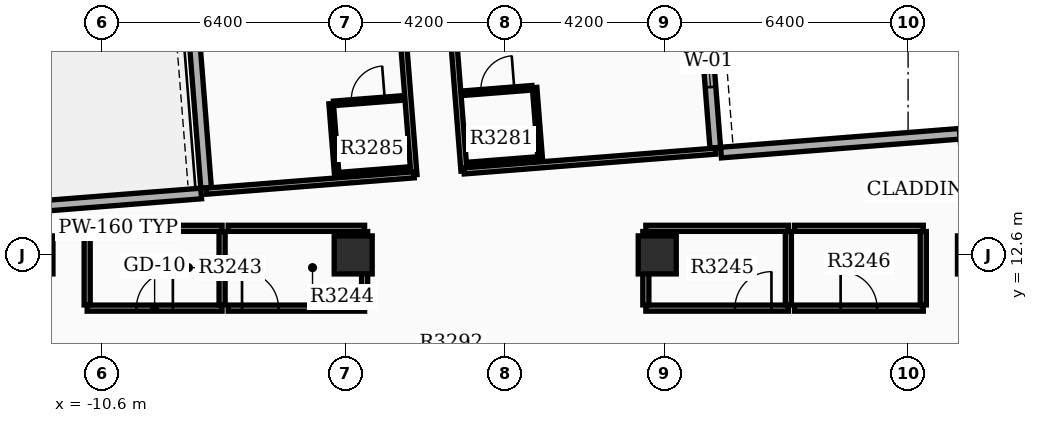
"""IFC4 building model, lengths in metres.
Left out: names, types, materials, properties, quantities, classifications, styles, units other than length and angle.
Written with IfcOpenShell. Run it as: python <this file> out.ifc"""

import sys

from ifc_helpers import new_model, si_unit, direction, frame, frame_2d, origin, origin_2d, place, context, subcontext, project, spatial, rectangle, extrude, element, fill, save


model = new_model("IFC4")
c1 = context("Model", 3, precision=1e-05, world=origin(), true_north=direction((0.0, 1.0)))
c2 = subcontext(c1, "Body", "Model", "MODEL_VIEW")
j1 = project(units=[si_unit("LENGTHUNIT", "METRE"), si_unit("PLANEANGLEUNIT", "RADIAN")], contexts=[c1])
p1 = place(None, origin())
s1 = spatial("IfcSite", under=j1, at=p1, CompositionType="ELEMENT")
p2 = place(p1, origin())
s2 = spatial("IfcBuilding", under=s1, at=p2, CompositionType="ELEMENT")
p3 = place(p2, frame((0.0, 0.0, 205.2)))
s3 = spatial("IfcBuildingStorey", under=s2, at=p3, CompositionType="ELEMENT", Elevation=205.2)
for number, where, z_axis, x_axis in (
    (1, (12.4, 12.6, 0.0), (0.0, 0.0, 1.0), (1.0, 0.0, 0.0)),
    (2, (-12.4, 12.6, 0.0), (0.0, 0.0, 1.0), (1.0, 0.0, 0.0)),
    (3, (4.0, 12.6, 0.0), (0.0, 0.0, 1.0), (1.0, 0.0, 0.0)),
    (4, (-4.0, 12.6, 0.0), (0.0, 0.0, 1.0), (1.0, 0.0, 0.0)),
):
    element("IfcColumn", number, at=place(p3, frame(where, z_axis=z_axis, x_axis=x_axis)), inside=s3, PredefinedType="COLUMN", context=c2, shape_type="SweptSolid", body=[
        extrude(rectangle(XDim=1.0, YDim=1.0, at=origin_2d()), origin(), (0.0, 0.0, 1.0), 3.9),
    ])
p4 = place(p3, frame((5.527, 15.421, 0.0), z_axis=(0.0, 0.0, 1.0), x_axis=(-0.078452802979, 0.996917828963, 0.0)))
e5 = element("IfcWall", 5, at=p4, inside=s3, PredefinedType="STANDARD", context=c2, shape_type="SweptSolid", body=[
    extrude(rectangle(XDim=20.1, YDim=0.28, at=frame_2d((10.05, 0.0))), origin(), (0.0, 0.0, 1.0), 3.18),
])
p5 = place(p4, frame((1.6, 0.0, 0.8)))
e6 = element("IfcOpeningElement", 6, at=p5, cuts=e5, PredefinedType="OPENING", context=c2, shape_type="SweptSolid", body=[
    extrude(rectangle(XDim=1.4, YDim=1.6, at=frame_2d((0.7, 0.8))), frame((0.0, 0.15, 0.0), z_axis=(0.0, -1.0, 0.0), x_axis=(1.0, 0.0, 0.0)), (0.0, 0.0, 1.0), 0.3),
])
p6 = place(p4, frame((4.8, 0.0, 0.8)))
e7 = element("IfcOpeningElement", 7, at=p6, cuts=e5, PredefinedType="OPENING", context=c2, shape_type="SweptSolid", body=[
    extrude(rectangle(XDim=1.4, YDim=1.6, at=frame_2d((0.7, 0.8))), frame((0.0, 0.15, 0.0), z_axis=(0.0, -1.0, 0.0), x_axis=(1.0, 0.0, 0.0)), (0.0, 0.0, 1.0), 0.3),
])
p7 = place(p4, frame((12.75, 0.0, 0.8)))
e8 = element("IfcOpeningElement", 8, at=p7, cuts=e5, PredefinedType="OPENING", context=c2, shape_type="SweptSolid", body=[
    extrude(rectangle(XDim=1.4, YDim=1.6, at=frame_2d((0.7, 0.8))), frame((0.0, 0.15, 0.0), z_axis=(0.0, -1.0, 0.0), x_axis=(1.0, 0.0, 0.0)), (0.0, 0.0, 1.0), 0.3),
])
p8 = place(p4, frame((15.95, 0.0, 0.8)))
e9 = element("IfcOpeningElement", 9, at=p8, cuts=e5, PredefinedType="OPENING", context=c2, shape_type="SweptSolid", body=[
    extrude(rectangle(XDim=1.4, YDim=1.6, at=frame_2d((0.7, 0.8))), frame((0.0, 0.15, 0.0), z_axis=(0.0, -1.0, 0.0), x_axis=(1.0, 0.0, 0.0)), (0.0, 0.0, 1.0), 0.3),
])
p9 = place(p3, frame((-9.448, 34.405, 0.0), z_axis=(0.0, 0.0, 1.0), x_axis=(0.078452802979, -0.996917828963, 0.0)))
e10 = element("IfcWall", 10, at=p9, inside=s3, PredefinedType="STANDARD", context=c2, shape_type="SweptSolid", body=[
    extrude(rectangle(XDim=20.1, YDim=0.28, at=frame_2d((10.05, 0.0))), origin(), (0.0, 0.0, 1.0), 3.18),
])
p10 = place(p9, frame((1.6, 0.0, 0.8)))
e11 = element("IfcOpeningElement", 11, at=p10, cuts=e10, PredefinedType="OPENING", context=c2, shape_type="SweptSolid", body=[
    extrude(rectangle(XDim=1.4, YDim=1.6, at=frame_2d((0.7, 0.8))), frame((0.0, 0.15, 0.0), z_axis=(0.0, -1.0, 0.0), x_axis=(1.0, 0.0, 0.0)), (0.0, 0.0, 1.0), 0.3),
])
p11 = place(p9, frame((4.8, 0.0, 0.8)))
e12 = element("IfcOpeningElement", 12, at=p11, cuts=e10, PredefinedType="OPENING", context=c2, shape_type="SweptSolid", body=[
    extrude(rectangle(XDim=1.4, YDim=1.6, at=frame_2d((0.7, 0.8))), frame((0.0, 0.15, 0.0), z_axis=(0.0, -1.0, 0.0), x_axis=(1.0, 0.0, 0.0)), (0.0, 0.0, 1.0), 0.3),
])
p12 = place(p9, frame((8.0, 0.0, 0.8)))
e13 = element("IfcOpeningElement", 13, at=p12, cuts=e10, PredefinedType="OPENING", context=c2, shape_type="SweptSolid", body=[
    extrude(rectangle(XDim=1.4, YDim=1.6, at=frame_2d((0.7, 0.8))), frame((0.0, 0.15, 0.0), z_axis=(0.0, -1.0, 0.0), x_axis=(1.0, 0.0, 0.0)), (0.0, 0.0, 1.0), 0.3),
])
p13 = place(p9, frame((11.2, 0.0, 0.8)))
e14 = element("IfcOpeningElement", 14, at=p13, cuts=e10, PredefinedType="OPENING", context=c2, shape_type="SweptSolid", body=[
    extrude(rectangle(XDim=1.4, YDim=1.6, at=frame_2d((0.7, 0.8))), frame((0.0, 0.15, 0.0), z_axis=(0.0, -1.0, 0.0), x_axis=(1.0, 0.0, 0.0)), (0.0, 0.0, 1.0), 0.3),
])
p14 = place(p9, frame((15.0, 0.0, 0.0)))
e15 = element("IfcOpeningElement", 15, at=p14, cuts=e10, PredefinedType="OPENING", context=c2, shape_type="SweptSolid", body=[
    extrude(rectangle(XDim=0.96, YDim=2.1, at=frame_2d((0.48, 1.05))), frame((0.0, 0.15, 0.0), z_axis=(0.0, -1.0, 0.0), x_axis=(1.0, 0.0, 0.0)), (0.0, 0.0, 1.0), 0.3),
])
p15 = place(p3, frame((11.958, 15.787, 0.0), z_axis=(0.0, 0.0, 1.0), x_axis=(-0.996916125428, -0.078474447191, 0.0)))
e16 = element("IfcWall", 16, at=p15, inside=s3, PredefinedType="STANDARD", context=c2, shape_type="SweptSolid", body=[
    extrude(rectangle(XDim=6.3, YDim=0.28, at=frame_2d((3.15, 0.0))), origin(), (0.0, 0.0, 1.0), 3.18),
])
p16 = place(p3, frame((-14.281, 13.722, 0.0), z_axis=(0.0, 0.0, 1.0), x_axis=(0.99691915642, 0.078435932851, 0.0)))
e17 = element("IfcWall", 17, at=p16, inside=s3, PredefinedType="STANDARD", context=c2, shape_type="SweptSolid", body=[
    extrude(rectangle(XDim=6.3, YDim=0.28, at=frame_2d((3.15, 0.0))), origin(), (0.0, 0.0, 1.0), 3.18),
])
p17 = place(p3, frame((-11.0, 11.2, 0.0), z_axis=(0.0, 0.0, 1.0), x_axis=(1.0, 0.0, 0.0)))
e18 = element("IfcWall", 18, at=p17, inside=s3, PredefinedType="PARTITIONING", context=c2, shape_type="SweptSolid", body=[
    extrude(rectangle(XDim=3.55, YDim=0.16, at=frame_2d((1.775, 0.0))), origin(), (0.0, 0.0, 1.0), 3.17),
])
p18 = place(p17, frame((1.295, 0.0, 0.0)))
e19 = element("IfcOpeningElement", 19, at=p18, cuts=e18, PredefinedType="OPENING", context=c2, shape_type="SweptSolid", body=[
    extrude(rectangle(XDim=0.96, YDim=2.15, at=frame_2d((0.48, 1.075))), frame((0.0, 0.09, 0.0), z_axis=(0.0, -1.0, 0.0), x_axis=(1.0, 0.0, 0.0)), (0.0, 0.0, 1.0), 0.18),
])
p19 = place(p3, frame((-11.0, 13.3, 0.0), z_axis=(0.0, 0.0, 1.0), x_axis=(1.0, 0.0, 0.0)))
e20 = element("IfcWall", 20, at=p19, inside=s3, PredefinedType="PARTITIONING", context=c2, shape_type="SweptSolid", body=[
    extrude(rectangle(XDim=3.55, YDim=0.16, at=frame_2d((1.775, 0.0))), origin(), (0.0, 0.0, 1.0), 3.17),
])
for number, where, z_axis, x_axis in (
    (21, (-11.0, 11.285, 0.0), (0.0, 0.0, 1.0), (0.0, 1.0, 0.0)),
    (22, (-7.45, 11.285, 0.0), (0.0, 0.0, 1.0), (0.0, 1.0, 0.0)),
):
    element("IfcWall", number, at=place(p3, frame(where, z_axis=z_axis, x_axis=x_axis)), inside=s3, PredefinedType="PARTITIONING", context=c2, shape_type="SweptSolid", body=[
        extrude(rectangle(XDim=1.93, YDim=0.16, at=frame_2d((0.965, 0.0))), origin(), (0.0, 0.0, 1.0), 3.17),
    ])
p20 = place(p3, frame((-7.29, 11.2, 0.0), z_axis=(0.0, 0.0, 1.0), x_axis=(1.0, 0.0, 0.0)))
e23 = element("IfcWall", 23, at=p20, inside=s3, PredefinedType="PARTITIONING", context=c2, shape_type="SweptSolid", body=[
    extrude(rectangle(XDim=3.59, YDim=0.16, at=frame_2d((1.795, 0.0))), origin(), (0.0, 0.0, 1.0), 3.17),
])
p21 = place(p20, frame((0.365, 0.0, 0.0)))
e24 = element("IfcOpeningElement", 24, at=p21, cuts=e23, PredefinedType="OPENING", context=c2, shape_type="SweptSolid", body=[
    extrude(rectangle(XDim=0.96, YDim=2.15, at=frame_2d((0.48, 1.075))), frame((0.0, 0.09, 0.0), z_axis=(0.0, -1.0, 0.0), x_axis=(1.0, 0.0, 0.0)), (0.0, 0.0, 1.0), 0.18),
])
p22 = place(p3, frame((-7.29, 13.3, 0.0), z_axis=(0.0, 0.0, 1.0), x_axis=(1.0, 0.0, 0.0)))
e25 = element("IfcWall", 25, at=p22, inside=s3, PredefinedType="PARTITIONING", context=c2, shape_type="SweptSolid", body=[
    extrude(rectangle(XDim=3.59, YDim=0.16, at=frame_2d((1.795, 0.0))), origin(), (0.0, 0.0, 1.0), 3.17),
])
p23 = place(p3, frame((-3.7, 11.285, 0.0), z_axis=(0.0, 0.0, 1.0), x_axis=(0.0, 1.0, 0.0)))
e26 = element("IfcWall", 26, at=p23, inside=s3, PredefinedType="PARTITIONING", context=c2, shape_type="SweptSolid", body=[
    extrude(rectangle(XDim=1.93, YDim=0.16, at=frame_2d((0.965, 0.0))), origin(), (0.0, 0.0, 1.0), 3.17),
])
p24 = place(p3, frame((3.7, 11.2, 0.0), z_axis=(0.0, 0.0, 1.0), x_axis=(1.0, 0.0, 0.0)))
e27 = element("IfcWall", 27, at=p24, inside=s3, PredefinedType="PARTITIONING", context=c2, shape_type="SweptSolid", body=[
    extrude(rectangle(XDim=3.75, YDim=0.16, at=frame_2d((1.875, 0.0))), origin(), (0.0, 0.0, 1.0), 3.17),
])
p25 = place(p24, frame((2.345, 0.0, 0.0)))
e28 = element("IfcOpeningElement", 28, at=p25, cuts=e27, PredefinedType="OPENING", context=c2, shape_type="SweptSolid", body=[
    extrude(rectangle(XDim=0.96, YDim=2.15, at=frame_2d((0.48, 1.075))), frame((0.0, 0.09, 0.0), z_axis=(0.0, -1.0, 0.0), x_axis=(1.0, 0.0, 0.0)), (0.0, 0.0, 1.0), 0.18),
])
p26 = place(p3, frame((3.7, 13.3, 0.0), z_axis=(0.0, 0.0, 1.0), x_axis=(1.0, 0.0, 0.0)))
e29 = element("IfcWall", 29, at=p26, inside=s3, PredefinedType="PARTITIONING", context=c2, shape_type="SweptSolid", body=[
    extrude(rectangle(XDim=3.75, YDim=0.16, at=frame_2d((1.875, 0.0))), origin(), (0.0, 0.0, 1.0), 3.17),
])
for number, where, z_axis, x_axis in (
    (30, (3.7, 11.285, 0.0), (0.0, 0.0, 1.0), (0.0, 1.0, 0.0)),
    (31, (7.45, 11.285, 0.0), (0.0, 0.0, 1.0), (0.0, 1.0, 0.0)),
):
    element("IfcWall", number, at=place(p3, frame(where, z_axis=z_axis, x_axis=x_axis)), inside=s3, PredefinedType="PARTITIONING", context=c2, shape_type="SweptSolid", body=[
        extrude(rectangle(XDim=1.93, YDim=0.16, at=frame_2d((0.965, 0.0))), origin(), (0.0, 0.0, 1.0), 3.17),
    ])
p27 = place(p3, frame((7.61, 11.2, 0.0), z_axis=(0.0, 0.0, 1.0), x_axis=(1.0, 0.0, 0.0)))
e32 = element("IfcWall", 32, at=p27, inside=s3, PredefinedType="PARTITIONING", context=c2, shape_type="SweptSolid", body=[
    extrude(rectangle(XDim=3.39, YDim=0.16, at=frame_2d((1.695, 0.0))), origin(), (0.0, 0.0, 1.0), 3.17),
])
p28 = place(p27, frame((1.215, 0.0, 0.0)))
e33 = element("IfcOpeningElement", 33, at=p28, cuts=e32, PredefinedType="OPENING", context=c2, shape_type="SweptSolid", body=[
    extrude(rectangle(XDim=0.96, YDim=2.15, at=frame_2d((0.48, 1.075))), frame((0.0, 0.09, 0.0), z_axis=(0.0, -1.0, 0.0), x_axis=(1.0, 0.0, 0.0)), (0.0, 0.0, 1.0), 0.18),
])
p29 = place(p3, frame((7.61, 13.3, 0.0), z_axis=(0.0, 0.0, 1.0), x_axis=(1.0, 0.0, 0.0)))
e34 = element("IfcWall", 34, at=p29, inside=s3, PredefinedType="PARTITIONING", context=c2, shape_type="SweptSolid", body=[
    extrude(rectangle(XDim=3.39, YDim=0.16, at=frame_2d((1.695, 0.0))), origin(), (0.0, 0.0, 1.0), 3.17),
])
p30 = place(p3, frame((11.0, 11.285, 0.0), z_axis=(0.0, 0.0, 1.0), x_axis=(0.0, 1.0, 0.0)))
e35 = element("IfcWall", 35, at=p30, inside=s3, PredefinedType="PARTITIONING", context=c2, shape_type="SweptSolid", body=[
    extrude(rectangle(XDim=1.93, YDim=0.16, at=frame_2d((0.965, 0.0))), origin(), (0.0, 0.0, 1.0), 3.17),
])
p31 = place(p3, frame((-1.085, 14.811, 0.0), z_axis=(0.0, 0.0, 1.0), x_axis=(-0.0784484395, 0.996918172339, 0.0)))
e36 = element("IfcWall", 36, at=p31, inside=s3, PredefinedType="PARTITIONING", context=c2, shape_type="SweptSolid", body=[
    extrude(rectangle(XDim=20.182, YDim=0.16, at=frame_2d((10.091, 0.0))), origin(), (0.0, 0.0, 1.0), 3.17),
])
p32 = place(p31, frame((8.08, 0.0, 0.0)))
e37 = element("IfcOpeningElement", 37, at=p32, cuts=e36, PredefinedType="OPENING", context=c2, shape_type="SweptSolid", body=[
    extrude(rectangle(XDim=0.96, YDim=2.15, at=frame_2d((0.48, 1.075))), frame((0.0, 0.09, 0.0), z_axis=(0.0, -1.0, 0.0), x_axis=(1.0, 0.0, 0.0)), (0.0, 0.0, 1.0), 0.18),
])
p33 = place(p31, frame((16.247, 0.0, 0.0)))
e38 = element("IfcOpeningElement", 38, at=p33, cuts=e36, PredefinedType="OPENING", context=c2, shape_type="SweptSolid", body=[
    extrude(rectangle(XDim=0.96, YDim=2.15, at=frame_2d((0.48, 1.075))), frame((0.0, 0.09, 0.0), z_axis=(0.0, -1.0, 0.0), x_axis=(1.0, 0.0, 0.0)), (0.0, 0.0, 1.0), 0.18),
])
p34 = place(p3, frame((-1.085, 14.811, 0.0), z_axis=(0.0, 0.0, 1.0), x_axis=(0.996917098135, 0.078462089231, 0.0)))
e39 = element("IfcWall", 39, at=p34, inside=s3, PredefinedType="PARTITIONING", context=c2, shape_type="SweptSolid", body=[
    extrude(rectangle(XDim=6.64, YDim=0.16, at=frame_2d((3.32, 0.0))), origin(), (0.0, 0.0, 1.0), 3.17),
])
p35 = place(p3, frame((-1.106, 16.855, 0.0), z_axis=(0.0, 0.0, 1.0), x_axis=(0.996916400774, 0.0784709492, 0.0)))
e40 = element("IfcWall", 40, at=p35, inside=s3, PredefinedType="PARTITIONING", context=c2, shape_type="SweptSolid", body=[
    extrude(rectangle(XDim=1.82, YDim=0.12, at=frame_2d((0.91, 0.0))), origin(), (0.0, 0.0, 1.0), 3.17),
])
p36 = place(p35, frame((0.47, 0.0, 0.0)))
e41 = element("IfcOpeningElement", 41, at=p36, cuts=e40, PredefinedType="OPENING", context=c2, shape_type="SweptSolid", body=[
    extrude(rectangle(XDim=0.88, YDim=2.1, at=frame_2d((0.44, 1.05))), frame((0.0, 0.07, 0.0), z_axis=(0.0, -1.0, 0.0), x_axis=(1.0, 0.0, 0.0)), (0.0, 0.0, 1.0), 0.14),
])
p37 = place(p3, frame((-0.958, 14.981, 0.0), z_axis=(0.0, 0.0, 1.0), x_axis=(0.996915574626, 0.078481444107, 0.0)))
e42 = element("IfcWall", 42, at=p37, inside=s3, PredefinedType="PARTITIONING", context=c2, shape_type="SweptSolid", body=[
    extrude(rectangle(XDim=1.82, YDim=0.12, at=frame_2d((0.91, 0.0))), origin(), (0.0, 0.0, 1.0), 3.17),
])
p38 = place(p3, frame((0.921, 15.129, 0.0), z_axis=(0.0, 0.0, 1.0), x_axis=(-0.078563244057, 0.996909131608, 0.0)))
e43 = element("IfcWall", 43, at=p38, inside=s3, PredefinedType="PARTITIONING", context=c2, shape_type="SweptSolid", body=[
    extrude(rectangle(XDim=1.88, YDim=0.12, at=frame_2d((0.94, 0.0))), origin(), (0.0, 0.0, 1.0), 3.17),
])
p39 = place(p3, frame((-2.401, 14.707, 0.0), z_axis=(0.0, 0.0, 1.0), x_axis=(-0.078460461943, 0.996917226209, 0.0)))
e44 = element("IfcWall", 44, at=p39, inside=s3, PredefinedType="PARTITIONING", context=c2, shape_type="SweptSolid", body=[
    extrude(rectangle(XDim=20.182, YDim=0.16, at=frame_2d((10.091, 0.0))), origin(), (0.0, 0.0, 1.0), 3.17),
])
p40 = place(p39, frame((8.08, 0.0, 0.0)))
e45 = element("IfcOpeningElement", 45, at=p40, cuts=e44, PredefinedType="OPENING", context=c2, shape_type="SweptSolid", body=[
    extrude(rectangle(XDim=0.96, YDim=2.15, at=frame_2d((0.48, 1.075))), frame((0.0, 0.09, 0.0), z_axis=(0.0, -1.0, 0.0), x_axis=(1.0, 0.0, 0.0)), (0.0, 0.0, 1.0), 0.18),
])
p41 = place(p39, frame((16.247, 0.0, 0.0)))
e46 = element("IfcOpeningElement", 46, at=p41, cuts=e44, PredefinedType="OPENING", context=c2, shape_type="SweptSolid", body=[
    extrude(rectangle(XDim=0.96, YDim=2.15, at=frame_2d((0.48, 1.075))), frame((0.0, 0.09, 0.0), z_axis=(0.0, -1.0, 0.0), x_axis=(1.0, 0.0, 0.0)), (0.0, 0.0, 1.0), 0.18),
])
p42 = place(p3, frame((-2.401, 14.707, 0.0), z_axis=(0.0, 0.0, 1.0), x_axis=(-0.996921193864, -0.078410032676, 0.0)))
e47 = element("IfcWall", 47, at=p42, inside=s3, PredefinedType="PARTITIONING", context=c2, shape_type="SweptSolid", body=[
    extrude(rectangle(XDim=5.48, YDim=0.16, at=frame_2d((2.74, 0.0))), origin(), (0.0, 0.0, 1.0), 3.17),
])
p43 = place(p3, frame((-4.515, 16.587, 0.0), z_axis=(0.0, 0.0, 1.0), x_axis=(0.996916400774, 0.0784709492, 0.0)))
e48 = element("IfcWall", 48, at=p43, inside=s3, PredefinedType="PARTITIONING", context=c2, shape_type="SweptSolid", body=[
    extrude(rectangle(XDim=1.82, YDim=0.12, at=frame_2d((0.91, 0.0))), origin(), (0.0, 0.0, 1.0), 3.17),
])
p44 = place(p43, frame((0.47, 0.0, 0.0)))
e49 = element("IfcOpeningElement", 49, at=p44, cuts=e48, PredefinedType="OPENING", context=c2, shape_type="SweptSolid", body=[
    extrude(rectangle(XDim=0.88, YDim=2.1, at=frame_2d((0.44, 1.05))), frame((0.0, 0.07, 0.0), z_axis=(0.0, -1.0, 0.0), x_axis=(1.0, 0.0, 0.0)), (0.0, 0.0, 1.0), 0.14),
])
p45 = place(p3, frame((-4.368, 14.713, 0.0), z_axis=(0.0, 0.0, 1.0), x_axis=(0.996916400774, 0.0784709492, 0.0)))
e50 = element("IfcWall", 50, at=p45, inside=s3, PredefinedType="PARTITIONING", context=c2, shape_type="SweptSolid", body=[
    extrude(rectangle(XDim=1.82, YDim=0.12, at=frame_2d((0.91, 0.0))), origin(), (0.0, 0.0, 1.0), 3.17),
])
p46 = place(p3, frame((-4.433, 14.708, 0.0), z_axis=(0.0, 0.0, 1.0), x_axis=(-0.07843418698, 0.996919293781, 0.0)))
e51 = element("IfcWall", 51, at=p46, inside=s3, PredefinedType="PARTITIONING", context=c2, shape_type="SweptSolid", body=[
    extrude(rectangle(XDim=1.88, YDim=0.12, at=frame_2d((0.94, 0.0))), origin(), (0.0, 0.0, 1.0), 3.17),
])
p47 = place(p5, origin())
e52 = element("IfcWindow", 52, at=p47, inside=s3, PartitioningType="SINGLE_PANEL", PredefinedType="WINDOW", context=c2, shape_type="SweptSolid", body=[
    extrude(rectangle(XDim=1.4, YDim=1.6, at=frame_2d((0.7, 0.8))), frame((0.0, 0.03, 0.0), z_axis=(0.0, -1.0, 0.0), x_axis=(1.0, 0.0, 0.0)), (0.0, 0.0, 1.0), 0.06),
])
fill(e6, e52)
p48 = place(p18, origin())
e53 = element("IfcDoor", 53, at=p48, inside=s3, OperationType="SINGLE_SWING_RIGHT", PredefinedType="DOOR", context=c2, shape_type="SweptSolid", body=[
    extrude(rectangle(XDim=0.96, YDim=2.15, at=frame_2d((0.48, 1.075))), frame((0.0, 0.025, 0.0), z_axis=(0.0, -1.0, 0.0), x_axis=(1.0, 0.0, 0.0)), (0.0, 0.0, 1.0), 0.05),
])
fill(e19, e53)
p49 = place(p21, origin())
e54 = element("IfcDoor", 54, at=p49, inside=s3, OperationType="SINGLE_SWING_LEFT", PredefinedType="DOOR", context=c2, shape_type="SweptSolid", body=[
    extrude(rectangle(XDim=0.96, YDim=2.15, at=frame_2d((0.48, 1.075))), frame((0.0, 0.025, 0.0), z_axis=(0.0, -1.0, 0.0), x_axis=(1.0, 0.0, 0.0)), (0.0, 0.0, 1.0), 0.05),
])
fill(e24, e54)
p50 = place(p25, origin())
e55 = element("IfcDoor", 55, at=p50, inside=s3, OperationType="SINGLE_SWING_RIGHT", PredefinedType="DOOR", context=c2, shape_type="SweptSolid", body=[
    extrude(rectangle(XDim=0.96, YDim=2.15, at=frame_2d((0.48, 1.075))), frame((0.0, 0.025, 0.0), z_axis=(0.0, -1.0, 0.0), x_axis=(1.0, 0.0, 0.0)), (0.0, 0.0, 1.0), 0.05),
])
fill(e28, e55)
p51 = place(p28, origin())
e56 = element("IfcDoor", 56, at=p51, inside=s3, OperationType="SINGLE_SWING_LEFT", PredefinedType="DOOR", context=c2, shape_type="SweptSolid", body=[
    extrude(rectangle(XDim=0.96, YDim=2.15, at=frame_2d((0.48, 1.075))), frame((0.0, 0.025, 0.0), z_axis=(0.0, -1.0, 0.0), x_axis=(1.0, 0.0, 0.0)), (0.0, 0.0, 1.0), 0.05),
])
fill(e33, e56)
p52 = place(p36, origin())
e57 = element("IfcDoor", 57, at=p52, inside=s3, OperationType="SINGLE_SWING_RIGHT", PredefinedType="DOOR", context=c2, shape_type="SweptSolid", body=[
    extrude(rectangle(XDim=0.88, YDim=2.1, at=frame_2d((0.44, 1.05))), frame((0.0, 0.025, 0.0), z_axis=(0.0, -1.0, 0.0), x_axis=(1.0, 0.0, 0.0)), (0.0, 0.0, 1.0), 0.05),
])
fill(e41, e57)
p53 = place(p44, origin())
e58 = element("IfcDoor", 58, at=p53, inside=s3, OperationType="SINGLE_SWING_RIGHT", PredefinedType="DOOR", context=c2, shape_type="SweptSolid", body=[
    extrude(rectangle(XDim=0.88, YDim=2.1, at=frame_2d((0.44, 1.05))), frame((0.0, 0.025, 0.0), z_axis=(0.0, -1.0, 0.0), x_axis=(1.0, 0.0, 0.0)), (0.0, 0.0, 1.0), 0.05),
])
fill(e49, e58)
save(model, sys.argv[1])
